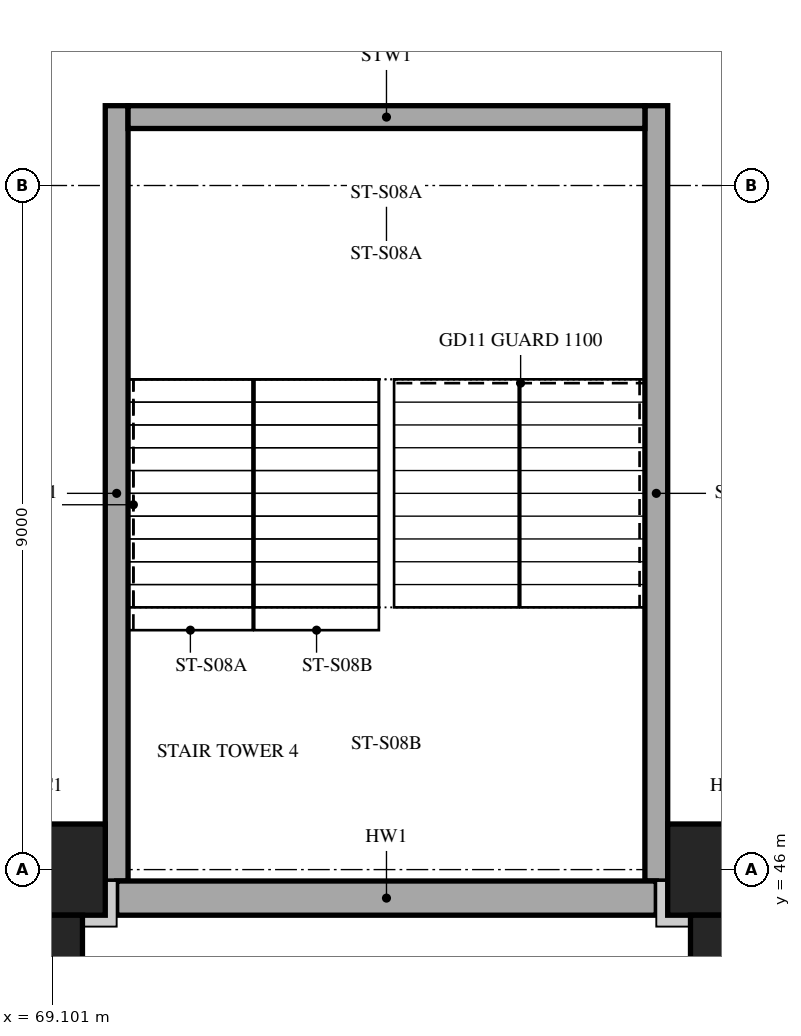
"""IFC4 building model, lengths in metres.
Left out: names, types, materials, properties, quantities, classifications, styles, units other than length and angle.
Written with IfcOpenShell. Run it as: python <this file> out.ifc"""

import sys

from ifc_helpers import new_model, si_unit, direction, frame, frame_2d, origin, origin_2d, place, context, subcontext, project, spatial, rectangle, extrude, element, save


model = new_model("IFC4")
c1 = context("Model", 3, precision=1e-05, world=origin(), true_north=direction((0.0, 1.0)))
c2 = subcontext(c1, "Body", "Model", "MODEL_VIEW")
j1 = project(units=[si_unit("LENGTHUNIT", "METRE"), si_unit("PLANEANGLEUNIT", "RADIAN")], contexts=[c1])
p1 = place(None, origin())
s1 = spatial("IfcSite", under=j1, at=p1, CompositionType="ELEMENT")
p2 = place(p1, origin())
s2 = spatial("IfcBuilding", under=s1, at=p2, CompositionType="ELEMENT")
p3 = place(p2, frame((0.0, 0.0, 10.0)))
s3 = spatial("IfcBuildingStorey", under=s2, at=p3, CompositionType="ELEMENT", Elevation=10.0)
for number, where, z_axis, x_axis in (
    (1, (69.0, 46.0, 0.0), (0.0, 0.0, 1.0), (1.0, 0.0, 0.0)),
    (2, (78.0, 46.0, 0.0), (0.0, 0.0, 1.0), (1.0, 0.0, 0.0)),
):
    element("IfcColumn", number, at=place(p3, frame(where, z_axis=z_axis, x_axis=x_axis)), inside=s3, PredefinedType="COLUMN", context=c2, shape_type="SweptSolid", body=[
        extrude(rectangle(XDim=1.6, YDim=1.2, at=origin_2d()), origin(), (0.0, 0.0, 1.0), 5.0),
    ])
for number, where, z_axis, x_axis in (
    (3, (69.95, 45.85, 0.0), (0.0, 0.0, 1.0), (0.0, 1.0, 0.0)),
    (4, (77.05, 45.85, 0.0), (0.0, 0.0, 1.0), (0.0, 1.0, 0.0)),
):
    element("IfcWall", number, at=place(p3, frame(where, z_axis=z_axis, x_axis=x_axis)), inside=s3, PredefinedType="SHEAR", context=c2, shape_type="SweptSolid", body=[
        extrude(rectangle(XDim=10.2, YDim=0.3, at=frame_2d((5.1, 0.0))), origin(), (0.0, 0.0, 1.0), 5.0),
    ])
p4 = place(p3, frame((70.1, 55.9, 0.0), z_axis=(0.0, 0.0, 1.0), x_axis=(1.0, 0.0, 0.0)))
e5 = element("IfcWall", 5, at=p4, inside=s3, PredefinedType="SHEAR", context=c2, shape_type="SweptSolid", body=[
    extrude(rectangle(XDim=6.8, YDim=0.3, at=frame_2d((3.4, 0.0))), origin(), (0.0, 0.0, 1.0), 5.0),
])
for number, where, z_axis, x_axis in (
    (6, (69.0, 44.9, 0.0), (0.0, 0.0, 1.0), (1.0, 0.0, 0.0)),
    (7, (78.0, 44.9, 0.0), (0.0, 0.0, 1.0), (1.0, 0.0, 0.0)),
):
    element("IfcColumn", number, at=place(p3, frame(where, z_axis=z_axis, x_axis=x_axis)), inside=s3, PredefinedType="COLUMN", context=c2, shape_type="SweptSolid", body=[
        extrude(rectangle(XDim=1.0, YDim=1.0, at=origin_2d()), origin(), (0.0, 0.0, 1.0), 3.4),
    ])
p5 = place(p3, frame((69.95, 45.625, 0.0), z_axis=(0.0, 0.0, 1.0), x_axis=(1.0, 0.0, 0.0)))
e8 = element("IfcWall", 8, at=p5, inside=s3, PredefinedType="SOLIDWALL", context=c2, shape_type="SweptSolid", body=[
    extrude(rectangle(XDim=7.1, YDim=0.45, at=frame_2d((3.55, 0.0))), origin(), (0.0, 0.0, 1.0), 5.0),
])
save(model, sys.argv[1])
